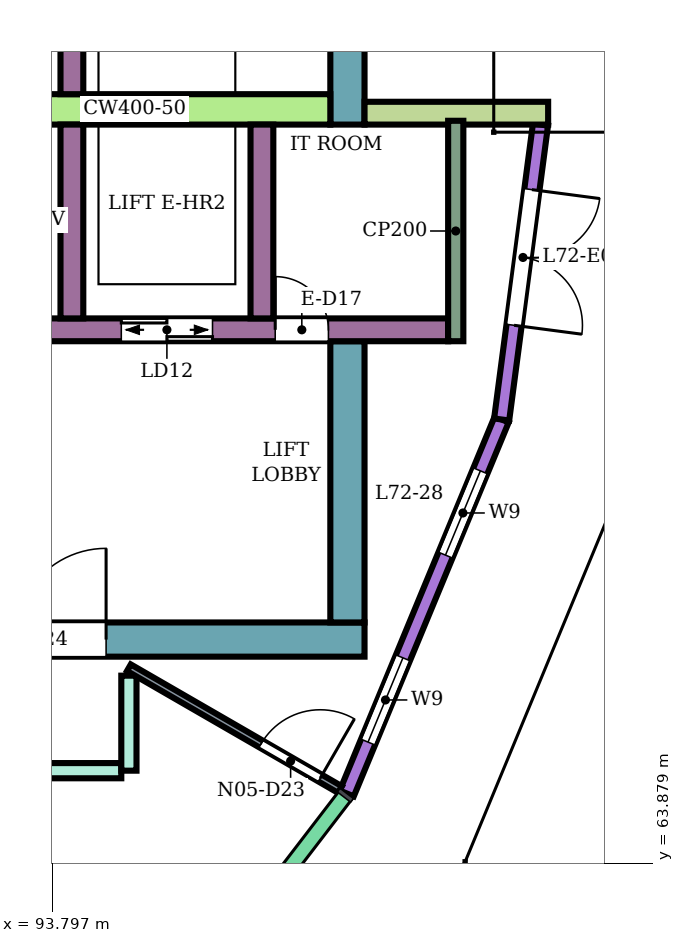
"""IFC4 building model, lengths in metres.
Left out: names, types, materials, properties, quantities, classifications, styles, units other than length and angle.
Written with IfcOpenShell. Run it as: python <this file> out.ifc"""

import sys

from ifc_helpers import new_model, si_unit, direction, frame, frame_2d, origin, place, context, subcontext, project, spatial, rectangle, extrude, element, fill, save


model = new_model("IFC4")
c1 = context("Model", 3, precision=1e-05, world=origin(), true_north=direction((0.0, 1.0)))
c2 = subcontext(c1, "Body", "Model", "MODEL_VIEW")
j1 = project(units=[si_unit("LENGTHUNIT", "METRE"), si_unit("PLANEANGLEUNIT", "RADIAN")], contexts=[c1])
p1 = place(None, origin())
s1 = spatial("IfcSite", under=j1, at=p1, CompositionType="ELEMENT")
p2 = place(p1, origin())
s2 = spatial("IfcBuilding", under=s1, at=p2, CompositionType="ELEMENT")
p3 = place(p2, frame((0.0, 0.0, 314.9)))
s3 = spatial("IfcBuildingStorey", under=s2, at=p3, CompositionType="ELEMENT", Elevation=314.9)
p4 = place(p3, frame((87.9, 66.825, 0.0), z_axis=(0.0, 0.0, 1.0), x_axis=(1.0, 0.0, 0.0)))
e1 = element("IfcWall", 1, at=p4, inside=s3, PredefinedType="SHEAR", context=c2, shape_type="SweptSolid", body=[
    extrude(rectangle(XDim=10.0, YDim=0.45, at=frame_2d((5.0, 0.0))), origin(), (0.0, 0.0, 1.0), 4.08),
])
p5 = place(p4, frame((4.2, 0.0, 0.0)))
e2 = element("IfcOpeningElement", 2, at=p5, cuts=e1, PredefinedType="OPENING", context=c2, shape_type="SweptSolid", body=[
    extrude(rectangle(XDim=2.4, YDim=2.4, at=frame_2d((1.2, 1.2))), frame((0.0, 0.235, 0.0), z_axis=(0.0, -1.0, 0.0), x_axis=(1.0, 0.0, 0.0)), (0.0, 0.0, 1.0), 0.47),
])
p6 = place(p3, frame((97.675, 73.6, 0.0), z_axis=(0.0, 0.0, 1.0), x_axis=(0.0, 1.0, 0.0)))
e3 = element("IfcWall", 3, at=p6, inside=s3, PredefinedType="SHEAR", context=c2, shape_type="SweptSolid", body=[
    extrude(rectangle(XDim=9.35, YDim=0.45, at=frame_2d((4.675, 0.0))), origin(), (0.0, 0.0, 1.0), 4.08),
])
p7 = place(p3, frame((97.675, 67.05, 0.0), z_axis=(0.0, 0.0, 1.0), x_axis=(0.0, 1.0, 0.0)))
e4 = element("IfcWall", 4, at=p7, inside=s3, PredefinedType="SHEAR", context=c2, shape_type="SweptSolid", body=[
    extrude(rectangle(XDim=3.7, YDim=0.45, at=frame_2d((1.85, 0.0))), origin(), (0.0, 0.0, 1.0), 4.08),
])
p8 = place(p3, frame((91.7, 73.8, 0.0), z_axis=(0.0, 0.0, 1.0), x_axis=(1.0, 0.0, 0.0)))
e5 = element("IfcWall", 5, at=p8, inside=s3, PredefinedType="SHEAR", context=c2, shape_type="SweptSolid", body=[
    extrude(rectangle(XDim=5.75, YDim=0.4, at=frame_2d((2.875, 0.0))), origin(), (0.0, 0.0, 1.0), 4.08),
])
p9 = place(p3, frame((91.7, 70.9, 0.0), z_axis=(0.0, 0.0, 1.0), x_axis=(1.0, 0.0, 0.0)))
e6 = element("IfcWall", 6, at=p9, inside=s3, PredefinedType="SHEAR", context=c2, shape_type="SweptSolid", body=[
    extrude(rectangle(XDim=7.3, YDim=0.3, at=frame_2d((3.65, 0.0))), origin(), (0.0, 0.0, 1.0), 4.08),
])
p10 = place(p9, frame((0.4, 0.0, 0.0)))
e7 = element("IfcOpeningElement", 7, at=p10, cuts=e6, PredefinedType="OPENING", context=c2, shape_type="SweptSolid", body=[
    extrude(rectangle(XDim=1.4, YDim=2.1, at=frame_2d((0.7, 1.05))), frame((0.0, 0.16, 0.0), z_axis=(0.0, -1.0, 0.0), x_axis=(1.0, 0.0, 0.0)), (0.0, 0.0, 1.0), 0.32),
])
p11 = place(p9, frame((3.0, 0.0, 0.0)))
e8 = element("IfcOpeningElement", 8, at=p11, cuts=e6, PredefinedType="OPENING", context=c2, shape_type="SweptSolid", body=[
    extrude(rectangle(XDim=1.2, YDim=2.1, at=frame_2d((0.6, 1.05))), frame((0.0, 0.16, 0.0), z_axis=(0.0, -1.0, 0.0), x_axis=(1.0, 0.0, 0.0)), (0.0, 0.0, 1.0), 0.32),
])
p12 = place(p9, frame((5.025, 0.0, 0.0)))
e9 = element("IfcOpeningElement", 9, at=p12, cuts=e6, PredefinedType="OPENING", context=c2, shape_type="SweptSolid", body=[
    extrude(rectangle(XDim=0.7, YDim=2.1, at=frame_2d((0.35, 1.05))), frame((0.0, 0.16, 0.0), z_axis=(0.0, -1.0, 0.0), x_axis=(1.0, 0.0, 0.0)), (0.0, 0.0, 1.0), 0.32),
])
for number, where, z_axis, x_axis in (
    (10, (94.05, 74.0, 0.0), (0.0, 0.0, 1.0), (0.0, 1.0, 0.0)),
    (11, (94.05, 71.05, 0.0), (0.0, 0.0, 1.0), (0.0, 1.0, 0.0)),
    (12, (96.55, 71.05, 0.0), (0.0, 0.0, 1.0), (0.0, 1.0, 0.0)),
):
    element("IfcWall", number, at=place(p3, frame(where, z_axis=z_axis, x_axis=x_axis)), inside=s3, PredefinedType="SHEAR", context=c2, shape_type="SweptSolid", body=[
        extrude(rectangle(XDim=2.55, YDim=0.3, at=frame_2d((1.275, 0.0))), origin(), (0.0, 0.0, 1.0), 4.08),
    ])
p13 = place(p3, frame((97.666, 64.801, 0.0), z_axis=(0.0, 0.0, 1.0), x_axis=(0.382690574388, 0.923876574156, 0.0)))
e13 = element("IfcWall", 13, at=p13, inside=s3, PredefinedType="NOTDEFINED", context=c2, shape_type="SweptSolid", body=[
    extrude(rectangle(XDim=5.325, YDim=0.2, at=frame_2d((2.663, 0.0))), origin(), (0.0, 0.0, 1.0), 4.4),
])
p14 = place(p13, frame((0.731, 0.0, 0.9)))
e14 = element("IfcOpeningElement", 14, at=p14, cuts=e13, PredefinedType="OPENING", context=c2, shape_type="SweptSolid", body=[
    extrude(rectangle(XDim=1.2, YDim=2.7, at=frame_2d((0.6, 1.35))), frame((0.0, 0.11, 0.0), z_axis=(0.0, -1.0, 0.0), x_axis=(1.0, 0.0, 0.0)), (0.0, 0.0, 1.0), 0.22),
])
p15 = place(p13, frame((3.394, 0.0, 0.9)))
e15 = element("IfcOpeningElement", 15, at=p15, cuts=e13, PredefinedType="OPENING", context=c2, shape_type="SweptSolid", body=[
    extrude(rectangle(XDim=1.2, YDim=2.7, at=frame_2d((0.6, 1.35))), frame((0.0, 0.11, 0.0), z_axis=(0.0, -1.0, 0.0), x_axis=(1.0, 0.0, 0.0)), (0.0, 0.0, 1.0), 0.22),
])
p16 = place(p3, frame((99.704, 69.72, 0.0), z_axis=(0.0, 0.0, 1.0), x_axis=(0.130512609533, 0.991446649474, 0.0)))
e16 = element("IfcWall", 16, at=p16, inside=s3, PredefinedType="NOTDEFINED", context=c2, shape_type="SweptSolid", body=[
    extrude(rectangle(XDim=3.913, YDim=0.2, at=frame_2d((1.957, 0.0))), origin(), (0.0, 0.0, 1.0), 4.4),
])
p17 = place(p16, frame((1.25, 0.0, 0.0)))
e17 = element("IfcOpeningElement", 17, at=p17, cuts=e16, PredefinedType="OPENING", context=c2, shape_type="SweptSolid", body=[
    extrude(rectangle(XDim=1.8, YDim=2.7, at=frame_2d((0.9, 1.35))), frame((0.0, 0.11, 0.0), z_axis=(0.0, -1.0, 0.0), x_axis=(1.0, 0.0, 0.0)), (0.0, 0.0, 1.0), 0.22),
])
p18 = place(p3, frame((97.9, 73.75, 0.0), z_axis=(0.0, 0.0, 1.0), x_axis=(1.0, 0.0, 0.0)))
e18 = element("IfcWall", 18, at=p18, inside=s3, PredefinedType="NOTDEFINED", context=c2, shape_type="SweptSolid", body=[
    extrude(rectangle(XDim=2.416, YDim=0.3, at=frame_2d((1.208, 0.0))), origin(), (0.0, 0.0, 1.0), 4.4),
])
p19 = place(p3, frame((91.8, 65.1, 0.0), z_axis=(0.0, 0.0, 1.0), x_axis=(1.0, 0.0, 0.0)))
e19 = element("IfcWall", 19, at=p19, inside=s3, PredefinedType="PARTITIONING", context=c2, shape_type="SweptSolid", body=[
    extrude(rectangle(XDim=2.9, YDim=0.2, at=frame_2d((1.45, 0.0))), origin(), (0.0, 0.0, 1.0), 3.95),
])
p20 = place(p3, frame((94.8, 65.1, 0.0), z_axis=(0.0, 0.0, 1.0), x_axis=(0.0, 1.0, 0.0)))
e20 = element("IfcWall", 20, at=p20, inside=s3, PredefinedType="PARTITIONING", context=c2, shape_type="SweptSolid", body=[
    extrude(rectangle(XDim=1.25, YDim=0.2, at=frame_2d((0.625, 0.0))), origin(), (0.0, 0.0, 1.0), 3.95),
])
p21 = place(p3, frame((94.8, 66.455, 0.0), z_axis=(0.0, 0.0, 1.0), x_axis=(0.866056279496, -0.499946517884, 0.0)))
e21 = element("IfcWall", 21, at=p21, inside=s3, PredefinedType="PARTITIONING", context=c2, shape_type="SweptSolid", body=[
    extrude(rectangle(XDim=3.207, YDim=0.1, at=frame_2d((1.604, 0.0))), origin(), (0.0, 0.0, 1.0), 3.95),
])
p22 = place(p21, frame((2.007, 0.0, 0.0)))
e22 = element("IfcOpeningElement", 22, at=p22, cuts=e21, PredefinedType="OPENING", context=c2, shape_type="SweptSolid", body=[
    extrude(rectangle(XDim=0.9, YDim=2.1, at=frame_2d((0.45, 1.05))), frame((0.0, 0.06, 0.0), z_axis=(0.0, -1.0, 0.0), x_axis=(1.0, 0.0, 0.0)), (0.0, 0.0, 1.0), 0.12),
])
p23 = place(p3, frame((99.1, 70.75, 0.0), z_axis=(0.0, 0.0, 1.0), x_axis=(0.0, 1.0, 0.0)))
e23 = element("IfcWall", 23, at=p23, inside=s3, PredefinedType="PARTITIONING", context=c2, shape_type="SweptSolid", body=[
    extrude(rectangle(XDim=2.9, YDim=0.2, at=frame_2d((1.45, 0.0))), origin(), (0.0, 0.0, 1.0), 4.08),
])
p24 = place(p14, origin())
e24 = element("IfcWindow", 24, at=p24, inside=s3, PartitioningType="SINGLE_PANEL", PredefinedType="WINDOW", context=c2, shape_type="SweptSolid", body=[
    extrude(rectangle(XDim=1.2, YDim=2.7, at=frame_2d((0.6, 1.35))), frame((0.0, 0.03, 0.0), z_axis=(0.0, -1.0, 0.0), x_axis=(1.0, 0.0, 0.0)), (0.0, 0.0, 1.0), 0.06),
])
fill(e14, e24)
p25 = place(p15, origin())
e25 = element("IfcWindow", 25, at=p25, inside=s3, PartitioningType="SINGLE_PANEL", PredefinedType="WINDOW", context=c2, shape_type="SweptSolid", body=[
    extrude(rectangle(XDim=1.2, YDim=2.7, at=frame_2d((0.6, 1.35))), frame((0.0, 0.03, 0.0), z_axis=(0.0, -1.0, 0.0), x_axis=(1.0, 0.0, 0.0)), (0.0, 0.0, 1.0), 0.06),
])
fill(e15, e25)
p26 = place(p17, frame((1.8, 0.0, 0.0), z_axis=(0.0, 0.0, 1.0), x_axis=(-1.0, 0.0, 0.0)))
e26 = element("IfcDoor", 26, at=p26, inside=s3, OperationType="DOUBLE_DOOR_SINGLE_SWING", PredefinedType="DOOR", context=c2, shape_type="SweptSolid", body=[
    extrude(rectangle(XDim=1.8, YDim=2.7, at=frame_2d((0.9, 1.35))), frame((0.0, 0.025, 0.0), z_axis=(0.0, -1.0, 0.0), x_axis=(1.0, 0.0, 0.0)), (0.0, 0.0, 1.0), 0.05),
])
fill(e17, e26)
p27 = place(p22, origin())
e27 = element("IfcDoor", 27, at=p27, inside=s3, OperationType="SINGLE_SWING_RIGHT", PredefinedType="DOOR", context=c2, shape_type="SweptSolid", body=[
    extrude(rectangle(XDim=0.9, YDim=2.1, at=frame_2d((0.45, 1.05))), frame((0.0, 0.025, 0.0), z_axis=(0.0, -1.0, 0.0), x_axis=(1.0, 0.0, 0.0)), (0.0, 0.0, 1.0), 0.05),
])
fill(e22, e27)
p28 = place(p11, origin())
e28 = element("IfcDoor", 28, at=p28, inside=s3, OperationType="DOUBLE_DOOR_SLIDING", PredefinedType="DOOR", context=c2, shape_type="SweptSolid", body=[
    extrude(rectangle(XDim=1.2, YDim=2.1, at=frame_2d((0.6, 1.05))), frame((0.0, 0.025, 0.0), z_axis=(0.0, -1.0, 0.0), x_axis=(1.0, 0.0, 0.0)), (0.0, 0.0, 1.0), 0.05),
])
fill(e8, e28)
p29 = place(p12, origin())
e29 = element("IfcDoor", 29, at=p29, inside=s3, OperationType="SINGLE_SWING_LEFT", PredefinedType="DOOR", context=c2, shape_type="SweptSolid", body=[
    extrude(rectangle(XDim=0.7, YDim=2.1, at=frame_2d((0.35, 1.05))), frame((0.0, 0.025, 0.0), z_axis=(0.0, -1.0, 0.0), x_axis=(1.0, 0.0, 0.0)), (0.0, 0.0, 1.0), 0.05),
])
fill(e9, e29)
p30 = place(p5, origin())
e30 = element("IfcDoor", 30, at=p30, inside=s3, OperationType="DOUBLE_DOOR_SINGLE_SWING", PredefinedType="DOOR", context=c2, shape_type="SweptSolid", body=[
    extrude(rectangle(XDim=2.4, YDim=2.4, at=frame_2d((1.2, 1.2))), frame((0.0, 0.025, 0.0), z_axis=(0.0, -1.0, 0.0), x_axis=(1.0, 0.0, 0.0)), (0.0, 0.0, 1.0), 0.05),
])
fill(e2, e30)
save(model, sys.argv[1])
